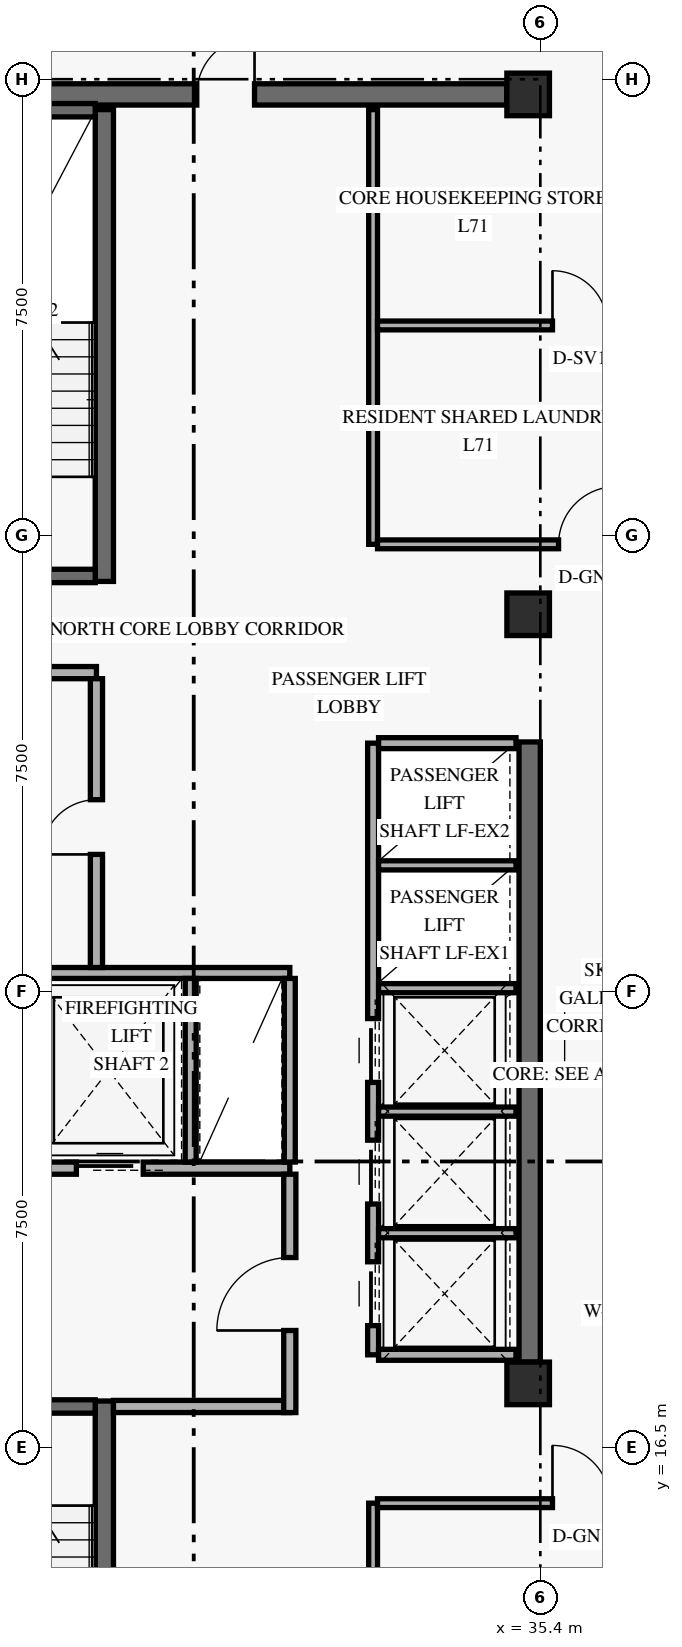
"""IFC4 building model, lengths in metres.
Left out: names, types, materials, properties, quantities, classifications, styles, units other than length and angle.
Written with IfcOpenShell. Run it as: python <this file> out.ifc"""

import sys

from ifc_helpers import new_model, si_unit, direction, frame, frame_2d, origin, origin_2d, place, context, subcontext, project, spatial, rectangle, extrude, element, fill, save


model = new_model("IFC4")
c1 = context("Model", 3, precision=1e-05, world=origin(), true_north=direction((0.0, 1.0)))
c2 = subcontext(c1, "Body", "Model", "MODEL_VIEW")
j1 = project(units=[si_unit("LENGTHUNIT", "METRE"), si_unit("PLANEANGLEUNIT", "RADIAN")], contexts=[c1])
p1 = place(None, origin())
s1 = spatial("IfcSite", under=j1, at=p1, CompositionType="ELEMENT")
p2 = place(p1, origin())
s2 = spatial("IfcBuilding", under=s1, at=p2, CompositionType="ELEMENT")
p3 = place(p2, frame((0.0, 0.0, 271.2)))
s3 = spatial("IfcBuildingStorey", under=s2, at=p3, CompositionType="ELEMENT", Elevation=271.2)
p4 = place(p3, frame((35.225, 17.9, 0.0), z_axis=(0.0, 0.0, 1.0), x_axis=(0.0, 1.0, 0.0)))
e1 = element("IfcWall", 1, at=p4, inside=s3, PredefinedType="SHEAR", context=c2, shape_type="SweptSolid", body=[
    extrude(rectangle(XDim=10.2, YDim=0.35, at=frame_2d((5.1, 0.0))), origin(), (0.0, 0.0, 1.0), 2.821),
])
p5 = place(p3, frame((24.55, 38.75, 0.0), z_axis=(0.0, 0.0, 1.0), x_axis=(1.0, 0.0, 0.0)))
e2 = element("IfcWall", 2, at=p5, inside=s3, PredefinedType="SHEAR", context=c2, shape_type="SweptSolid", body=[
    extrude(rectangle(XDim=10.3, YDim=0.35, at=frame_2d((5.15, 0.0))), origin(), (0.0, 0.0, 1.0), 3.36),
])
p6 = place(p5, frame((5.2, 0.0, 0.0)))
e3 = element("IfcOpeningElement", 3, at=p6, cuts=e2, PredefinedType="OPENING", context=c2, shape_type="SweptSolid", body=[
    extrude(rectangle(XDim=0.95, YDim=2.15, at=frame_2d((0.475, 1.075))), frame((0.0, 0.185, 0.0), z_axis=(0.0, -1.0, 0.0), x_axis=(1.0, 0.0, 0.0)), (0.0, 0.0, 1.0), 0.37),
])
p7 = place(p3, frame((28.23, 9.5, 0.0), z_axis=(0.0, 0.0, 1.0), x_axis=(0.0, 1.0, 0.0)))
e4 = element("IfcWall", 4, at=p7, inside=s3, PredefinedType="SHEAR", context=c2, shape_type="SweptSolid", body=[
    extrude(rectangle(XDim=7.76, YDim=0.3, at=frame_2d((3.88, 0.0))), origin(), (0.0, 0.0, 1.0), 3.36),
])
p8 = place(p3, frame((24.92, 17.17, 0.0), z_axis=(0.0, 0.0, 1.0), x_axis=(1.0, 0.0, 0.0)))
e5 = element("IfcWall", 5, at=p8, inside=s3, PredefinedType="SHEAR", context=c2, shape_type="SweptSolid", body=[
    extrude(rectangle(XDim=3.16, YDim=0.22, at=frame_2d((1.58, 0.0))), origin(), (0.0, 0.0, 1.0), 3.36),
])
p9 = place(p8, frame((0.78, 0.0, 0.0)))
e6 = element("IfcOpeningElement", 6, at=p9, cuts=e5, PredefinedType="OPENING", context=c2, shape_type="SweptSolid", body=[
    extrude(rectangle(XDim=1.05, YDim=2.15, at=frame_2d((0.525, 1.075))), frame((0.0, 0.12, 0.0), z_axis=(0.0, -1.0, 0.0), x_axis=(1.0, 0.0, 0.0)), (0.0, 0.0, 1.0), 0.24),
])
p10 = place(p3, frame((28.23, 30.74, 0.0), z_axis=(0.0, 0.0, 1.0), x_axis=(0.0, 1.0, 0.0)))
e7 = element("IfcWall", 7, at=p10, inside=s3, PredefinedType="SHEAR", context=c2, shape_type="SweptSolid", body=[
    extrude(rectangle(XDim=7.76, YDim=0.3, at=frame_2d((3.88, 0.0))), origin(), (0.0, 0.0, 1.0), 3.36),
])
p11 = place(p3, frame((24.92, 30.83, 0.0), z_axis=(0.0, 0.0, 1.0), x_axis=(1.0, 0.0, 0.0)))
e8 = element("IfcWall", 8, at=p11, inside=s3, PredefinedType="SHEAR", context=c2, shape_type="SweptSolid", body=[
    extrude(rectangle(XDim=3.16, YDim=0.22, at=frame_2d((1.58, 0.0))), origin(), (0.0, 0.0, 1.0), 3.36),
])
p12 = place(p11, frame((0.78, 0.0, 0.0)))
e9 = element("IfcOpeningElement", 9, at=p12, cuts=e8, PredefinedType="OPENING", context=c2, shape_type="SweptSolid", body=[
    extrude(rectangle(XDim=1.05, YDim=2.15, at=frame_2d((0.525, 1.075))), frame((0.0, 0.12, 0.0), z_axis=(0.0, -1.0, 0.0), x_axis=(1.0, 0.0, 0.0)), (0.0, 0.0, 1.0), 0.24),
])
p13 = place(p3, frame((24.92, 38.49, 0.0), z_axis=(0.0, 0.0, 1.0), x_axis=(1.0, 0.0, 0.0)))
e10 = element("IfcWall", 10, at=p13, inside=s3, PredefinedType="SHEAR", context=c2, shape_type="SweptSolid", body=[
    extrude(rectangle(XDim=3.16, YDim=0.22, at=frame_2d((1.58, 0.0))), origin(), (0.0, 0.0, 1.0), 3.36),
])
for number, where, z_axis, x_axis in (
    (11, (35.2, 17.55, 0.0), (0.0, 0.0, 1.0), (1.0, 0.0, 0.0)),
    (12, (35.2, 30.2, 0.0), (0.0, 0.0, 1.0), (1.0, 0.0, 0.0)),
    (13, (35.2, 38.75, 0.0), (0.0, 0.0, 1.0), (1.0, 0.0, 0.0)),
):
    element("IfcColumn", number, at=place(p3, frame(where, z_axis=z_axis, x_axis=x_axis)), inside=s3, PredefinedType="COLUMN", context=c2, shape_type="SweptSolid", body=[
        extrude(rectangle(XDim=0.7, YDim=0.7, at=origin_2d()), origin(), (0.0, 0.0, 1.0), 3.6),
    ])
p14 = place(p3, frame((24.45, 21.09, 0.0), z_axis=(0.0, 0.0, 1.0), x_axis=(1.0, 0.0, 0.0)))
e14 = element("IfcWall", 14, at=p14, inside=s3, PredefinedType="STANDARD", context=c2, shape_type="SweptSolid", body=[
    extrude(rectangle(XDim=6.83, YDim=0.2, at=frame_2d((3.415, 0.0))), origin(), (0.0, 0.0, 1.0), 3.36),
])
p15 = place(p14, frame((0.72, 0.0, 0.0)))
e15 = element("IfcOpeningElement", 15, at=p15, cuts=e14, PredefinedType="OPENING", context=c2, shape_type="SweptSolid", body=[
    extrude(rectangle(XDim=1.1, YDim=2.2, at=frame_2d((0.55, 1.1))), frame((0.0, 0.11, 0.0), z_axis=(0.0, -1.0, 0.0), x_axis=(1.0, 0.0, 0.0)), (0.0, 0.0, 1.0), 0.22),
])
p16 = place(p14, frame((3.32, 0.0, 0.0)))
e16 = element("IfcOpeningElement", 16, at=p16, cuts=e14, PredefinedType="OPENING", context=c2, shape_type="SweptSolid", body=[
    extrude(rectangle(XDim=1.1, YDim=2.2, at=frame_2d((0.55, 1.1))), frame((0.0, 0.11, 0.0), z_axis=(0.0, -1.0, 0.0), x_axis=(1.0, 0.0, 0.0)), (0.0, 0.0, 1.0), 0.22),
])
p17 = place(p3, frame((28.38, 17.17, 0.0), z_axis=(0.0, 0.0, 1.0), x_axis=(1.0, 0.0, 0.0)))
e17 = element("IfcWall", 17, at=p17, inside=s3, PredefinedType="STANDARD", context=c2, shape_type="SweptSolid", body=[
    extrude(rectangle(XDim=2.9, YDim=0.2, at=frame_2d((1.45, 0.0))), origin(), (0.0, 0.0, 1.0), 3.36),
])
p18 = place(p3, frame((31.28, 17.07, 0.0), z_axis=(0.0, 0.0, 1.0), x_axis=(0.0, 1.0, 0.0)))
e18 = element("IfcWall", 18, at=p18, inside=s3, PredefinedType="STANDARD", context=c2, shape_type="SweptSolid", body=[
    extrude(rectangle(XDim=3.92, YDim=0.2, at=frame_2d((1.96, 0.0))), origin(), (0.0, 0.0, 1.0), 2.803),
])
p19 = place(p18, frame((1.35, 0.0, 0.0)))
e19 = element("IfcOpeningElement", 19, at=p19, cuts=e18, PredefinedType="OPENING", context=c2, shape_type="SweptSolid", body=[
    extrude(rectangle(XDim=1.2, YDim=2.15, at=frame_2d((0.6, 1.075))), frame((0.0, 0.11, 0.0), z_axis=(0.0, -1.0, 0.0), x_axis=(1.0, 0.0, 0.0)), (0.0, 0.0, 1.0), 0.22),
])
p20 = place(p3, frame((24.45, 24.3, 0.0), z_axis=(0.0, 0.0, 1.0), x_axis=(1.0, 0.0, 0.0)))
e20 = element("IfcWall", 20, at=p20, inside=s3, PredefinedType="STANDARD", context=c2, shape_type="SweptSolid", body=[
    extrude(rectangle(XDim=6.83, YDim=0.18, at=frame_2d((3.415, 0.0))), origin(), (0.0, 0.0, 1.0), 3.36),
])
for number, where, z_axis, x_axis in (
    (21, (29.65, 21.19, 0.0), (0.0, 0.0, 1.0), (0.0, 1.0, 0.0)),
    (22, (31.28, 21.19, 0.0), (0.0, 0.0, 1.0), (0.0, 1.0, 0.0)),
):
    element("IfcWall", number, at=place(p3, frame(where, z_axis=z_axis, x_axis=x_axis)), inside=s3, PredefinedType="STANDARD", context=c2, shape_type="SweptSolid", body=[
        extrude(rectangle(XDim=3.02, YDim=0.18, at=frame_2d((1.51, 0.0))), origin(), (0.0, 0.0, 1.0), 3.36),
    ])
p21 = place(p3, frame((24.45, 29.24, 0.0), z_axis=(0.0, 0.0, 1.0), x_axis=(1.0, 0.0, 0.0)))
e23 = element("IfcWall", 23, at=p21, inside=s3, PredefinedType="STANDARD", context=c2, shape_type="SweptSolid", body=[
    extrude(rectangle(XDim=3.65, YDim=0.2, at=frame_2d((1.825, 0.0))), origin(), (0.0, 0.0, 1.0), 3.36),
])
p22 = place(p3, frame((28.1, 24.39, 0.0), z_axis=(0.0, 0.0, 1.0), x_axis=(0.0, 1.0, 0.0)))
e24 = element("IfcWall", 24, at=p22, inside=s3, PredefinedType="STANDARD", context=c2, shape_type="SweptSolid", body=[
    extrude(rectangle(XDim=4.75, YDim=0.2, at=frame_2d((2.375, 0.0))), origin(), (0.0, 0.0, 1.0), 3.36),
])
p23 = place(p22, frame((1.86, 0.0, 0.0)))
e25 = element("IfcOpeningElement", 25, at=p23, cuts=e24, PredefinedType="OPENING", context=c2, shape_type="SweptSolid", body=[
    extrude(rectangle(XDim=0.9, YDim=2.1, at=frame_2d((0.45, 1.05))), frame((0.0, 0.11, 0.0), z_axis=(0.0, -1.0, 0.0), x_axis=(1.0, 0.0, 0.0)), (0.0, 0.0, 1.0), 0.22),
])
p24 = place(p3, frame((32.65, 18.02, 0.0), z_axis=(0.0, 0.0, 1.0), x_axis=(0.0, 1.0, 0.0)))
e26 = element("IfcWall", 26, at=p24, inside=s3, PredefinedType="STANDARD", context=c2, shape_type="SweptSolid", body=[
    extrude(rectangle(XDim=10.06, YDim=0.18, at=frame_2d((5.03, 0.0))), origin(), (0.0, 0.0, 1.0), 3.36),
])
p25 = place(p24, frame((0.48, 0.0, 0.0)))
e27 = element("IfcOpeningElement", 27, at=p25, cuts=e26, PredefinedType="OPENING", context=c2, shape_type="SweptSolid", body=[
    extrude(rectangle(XDim=1.05, YDim=2.2, at=frame_2d((0.525, 1.1))), frame((0.0, 0.1, 0.0), z_axis=(0.0, -1.0, 0.0), x_axis=(1.0, 0.0, 0.0)), (0.0, 0.0, 1.0), 0.2),
])
p26 = place(p24, frame((2.48, 0.0, 0.0)))
e28 = element("IfcOpeningElement", 28, at=p26, cuts=e26, PredefinedType="OPENING", context=c2, shape_type="SweptSolid", body=[
    extrude(rectangle(XDim=1.05, YDim=2.2, at=frame_2d((0.525, 1.1))), frame((0.0, 0.1, 0.0), z_axis=(0.0, -1.0, 0.0), x_axis=(1.0, 0.0, 0.0)), (0.0, 0.0, 1.0), 0.2),
])
p27 = place(p24, frame((4.48, 0.0, 0.0)))
e29 = element("IfcOpeningElement", 29, at=p27, cuts=e26, PredefinedType="OPENING", context=c2, shape_type="SweptSolid", body=[
    extrude(rectangle(XDim=1.05, YDim=2.2, at=frame_2d((0.525, 1.1))), frame((0.0, 0.1, 0.0), z_axis=(0.0, -1.0, 0.0), x_axis=(1.0, 0.0, 0.0)), (0.0, 0.0, 1.0), 0.2),
])
for number, where, z_axis, x_axis in (
    (30, (32.74, 18.02, 0.0), (0.0, 0.0, 1.0), (1.0, 0.0, 0.0)),
    (31, (32.74, 28.08, 0.0), (0.0, 0.0, 1.0), (1.0, 0.0, 0.0)),
):
    element("IfcWall", number, at=place(p3, frame(where, z_axis=z_axis, x_axis=x_axis)), inside=s3, PredefinedType="STANDARD", context=c2, shape_type="SweptSolid", body=[
        extrude(rectangle(XDim=2.26, YDim=0.18, at=frame_2d((1.13, 0.0))), origin(), (0.0, 0.0, 1.0), 3.36),
    ])
for number, where, z_axis, x_axis in (
    (32, (32.74, 20.02, 0.0), (0.0, 0.0, 1.0), (1.0, 0.0, 0.0)),
    (33, (32.74, 22.02, 0.0), (0.0, 0.0, 1.0), (1.0, 0.0, 0.0)),
    (34, (32.74, 24.05, 0.0), (0.0, 0.0, 1.0), (1.0, 0.0, 0.0)),
    (35, (32.74, 26.07, 0.0), (0.0, 0.0, 1.0), (1.0, 0.0, 0.0)),
):
    element("IfcWall", number, at=place(p3, frame(where, z_axis=z_axis, x_axis=x_axis)), inside=s3, PredefinedType="STANDARD", context=c2, shape_type="SweptSolid", body=[
        extrude(rectangle(XDim=2.26, YDim=0.15, at=frame_2d((1.13, 0.0))), origin(), (0.0, 0.0, 1.0), 3.36),
    ])
p28 = place(p3, frame((32.65, 9.5, 0.0), z_axis=(0.0, 0.0, 1.0), x_axis=(0.0, 1.0, 0.0)))
e36 = element("IfcWall", 36, at=p28, inside=s3, PredefinedType="PARTITIONING", context=c2, shape_type="SweptSolid", body=[
    extrude(rectangle(XDim=6.08, YDim=0.145, at=frame_2d((3.04, 0.0))), origin(), (0.0, 0.0, 1.0), 3.36),
])
p29 = place(p3, frame((32.722, 15.58, 0.0), z_axis=(0.0, 0.0, 1.0), x_axis=(1.0, 0.0, 0.0)))
e37 = element("IfcWall", 37, at=p29, inside=s3, PredefinedType="PARTITIONING", context=c2, shape_type="SweptSolid", body=[
    extrude(rectangle(XDim=5.228, YDim=0.145, at=frame_2d((2.614, 0.0))), origin(), (0.0, 0.0, 1.0), 2.803),
])
p30 = place(p29, frame((2.877, 0.0, 0.0)))
e38 = element("IfcOpeningElement", 38, at=p30, cuts=e37, PredefinedType="OPENING", context=c2, shape_type="SweptSolid", body=[
    extrude(rectangle(XDim=0.95, YDim=2.15, at=frame_2d((0.475, 1.075))), frame((0.0, 0.083, 0.0), z_axis=(0.0, -1.0, 0.0), x_axis=(1.0, 0.0, 0.0)), (0.0, 0.0, 1.0), 0.165),
])
p31 = place(p3, frame((32.65, 31.35, 0.0), z_axis=(0.0, 0.0, 1.0), x_axis=(0.0, 1.0, 0.0)))
e39 = element("IfcWall", 39, at=p31, inside=s3, PredefinedType="PARTITIONING", context=c2, shape_type="SweptSolid", body=[
    extrude(rectangle(XDim=7.15, YDim=0.145, at=frame_2d((3.575, 0.0))), origin(), (0.0, 0.0, 1.0), 3.36),
])
p32 = place(p3, frame((32.722, 31.35, 0.0), z_axis=(0.0, 0.0, 1.0), x_axis=(1.0, 0.0, 0.0)))
e40 = element("IfcWall", 40, at=p32, inside=s3, PredefinedType="PARTITIONING", context=c2, shape_type="SweptSolid", body=[
    extrude(rectangle(XDim=5.778, YDim=0.145, at=frame_2d((2.889, 0.0))), origin(), (0.0, 0.0, 1.0), 2.803),
])
p33 = place(p32, frame((2.978, 0.0, 0.0)))
e41 = element("IfcOpeningElement", 41, at=p33, cuts=e40, PredefinedType="OPENING", context=c2, shape_type="SweptSolid", body=[
    extrude(rectangle(XDim=0.95, YDim=2.15, at=frame_2d((0.475, 1.075))), frame((0.0, 0.083, 0.0), z_axis=(0.0, -1.0, 0.0), x_axis=(1.0, 0.0, 0.0)), (0.0, 0.0, 1.0), 0.165),
])
p34 = place(p3, frame((32.722, 34.95, 0.0), z_axis=(0.0, 0.0, 1.0), x_axis=(1.0, 0.0, 0.0)))
e42 = element("IfcWall", 42, at=p34, inside=s3, PredefinedType="PARTITIONING", context=c2, shape_type="SweptSolid", body=[
    extrude(rectangle(XDim=5.705, YDim=0.145, at=frame_2d((2.853, 0.0))), origin(), (0.0, 0.0, 1.0), 2.803),
])
p35 = place(p34, frame((2.877, 0.0, 0.0)))
e43 = element("IfcOpeningElement", 43, at=p35, cuts=e42, PredefinedType="OPENING", context=c2, shape_type="SweptSolid", body=[
    extrude(rectangle(XDim=0.9, YDim=2.1, at=frame_2d((0.45, 1.05))), frame((0.0, 0.083, 0.0), z_axis=(0.0, -1.0, 0.0), x_axis=(1.0, 0.0, 0.0)), (0.0, 0.0, 1.0), 0.165),
])
p36 = place(p16, origin())
e44 = element("IfcDoor", 44, at=p36, inside=s3, OperationType="SLIDING_TO_LEFT", PredefinedType="DOOR", context=c2, shape_type="SweptSolid", body=[
    extrude(rectangle(XDim=1.1, YDim=2.2, at=frame_2d((0.55, 1.1))), frame((0.0, 0.025, 0.0), z_axis=(0.0, -1.0, 0.0), x_axis=(1.0, 0.0, 0.0)), (0.0, 0.0, 1.0), 0.05),
])
fill(e16, e44)
p37 = place(p19, origin())
e45 = element("IfcDoor", 45, at=p37, inside=s3, OperationType="SINGLE_SWING_LEFT", PredefinedType="DOOR", context=c2, shape_type="SweptSolid", body=[
    extrude(rectangle(XDim=1.2, YDim=2.15, at=frame_2d((0.6, 1.075))), frame((0.0, 0.025, 0.0), z_axis=(0.0, -1.0, 0.0), x_axis=(1.0, 0.0, 0.0)), (0.0, 0.0, 1.0), 0.05),
])
fill(e19, e45)
p38 = place(p23, origin())
e46 = element("IfcDoor", 46, at=p38, inside=s3, OperationType="SINGLE_SWING_LEFT", PredefinedType="DOOR", context=c2, shape_type="SweptSolid", body=[
    extrude(rectangle(XDim=0.9, YDim=2.1, at=frame_2d((0.45, 1.05))), frame((0.0, 0.025, 0.0), z_axis=(0.0, -1.0, 0.0), x_axis=(1.0, 0.0, 0.0)), (0.0, 0.0, 1.0), 0.05),
])
fill(e25, e46)
p39 = place(p25, origin())
e47 = element("IfcDoor", 47, at=p39, inside=s3, OperationType="SLIDING_TO_LEFT", PredefinedType="DOOR", context=c2, shape_type="SweptSolid", body=[
    extrude(rectangle(XDim=1.05, YDim=2.2, at=frame_2d((0.525, 1.1))), frame((0.0, 0.025, 0.0), z_axis=(0.0, -1.0, 0.0), x_axis=(1.0, 0.0, 0.0)), (0.0, 0.0, 1.0), 0.05),
])
fill(e27, e47)
p40 = place(p26, origin())
e48 = element("IfcDoor", 48, at=p40, inside=s3, OperationType="SLIDING_TO_LEFT", PredefinedType="DOOR", context=c2, shape_type="SweptSolid", body=[
    extrude(rectangle(XDim=1.05, YDim=2.2, at=frame_2d((0.525, 1.1))), frame((0.0, 0.025, 0.0), z_axis=(0.0, -1.0, 0.0), x_axis=(1.0, 0.0, 0.0)), (0.0, 0.0, 1.0), 0.05),
])
fill(e28, e48)
p41 = place(p27, origin())
e49 = element("IfcDoor", 49, at=p41, inside=s3, OperationType="SLIDING_TO_LEFT", PredefinedType="DOOR", context=c2, shape_type="SweptSolid", body=[
    extrude(rectangle(XDim=1.05, YDim=2.2, at=frame_2d((0.525, 1.1))), frame((0.0, 0.025, 0.0), z_axis=(0.0, -1.0, 0.0), x_axis=(1.0, 0.0, 0.0)), (0.0, 0.0, 1.0), 0.05),
])
fill(e29, e49)
p42 = place(p30, origin())
e50 = element("IfcDoor", 50, at=p42, inside=s3, OperationType="SINGLE_SWING_LEFT", PredefinedType="DOOR", context=c2, shape_type="SweptSolid", body=[
    extrude(rectangle(XDim=0.95, YDim=2.15, at=frame_2d((0.475, 1.075))), frame((0.0, 0.025, 0.0), z_axis=(0.0, -1.0, 0.0), x_axis=(1.0, 0.0, 0.0)), (0.0, 0.0, 1.0), 0.05),
])
fill(e38, e50)
p43 = place(p33, origin())
e51 = element("IfcDoor", 51, at=p43, inside=s3, OperationType="SINGLE_SWING_RIGHT", PredefinedType="DOOR", context=c2, shape_type="SweptSolid", body=[
    extrude(rectangle(XDim=0.95, YDim=2.15, at=frame_2d((0.475, 1.075))), frame((0.0, 0.025, 0.0), z_axis=(0.0, -1.0, 0.0), x_axis=(1.0, 0.0, 0.0)), (0.0, 0.0, 1.0), 0.05),
])
fill(e41, e51)
p44 = place(p35, origin())
e52 = element("IfcDoor", 52, at=p44, inside=s3, OperationType="SINGLE_SWING_LEFT", PredefinedType="DOOR", context=c2, shape_type="SweptSolid", body=[
    extrude(rectangle(XDim=0.9, YDim=2.1, at=frame_2d((0.45, 1.05))), frame((0.0, 0.025, 0.0), z_axis=(0.0, -1.0, 0.0), x_axis=(1.0, 0.0, 0.0)), (0.0, 0.0, 1.0), 0.05),
])
fill(e43, e52)
p45 = place(p6, origin())
e53 = element("IfcDoor", 53, at=p45, inside=s3, OperationType="SINGLE_SWING_RIGHT", PredefinedType="DOOR", context=c2, shape_type="SweptSolid", body=[
    extrude(rectangle(XDim=0.95, YDim=2.15, at=frame_2d((0.475, 1.075))), frame((0.0, 0.025, 0.0), z_axis=(0.0, -1.0, 0.0), x_axis=(1.0, 0.0, 0.0)), (0.0, 0.0, 1.0), 0.05),
])
fill(e3, e53)
save(model, sys.argv[1])
